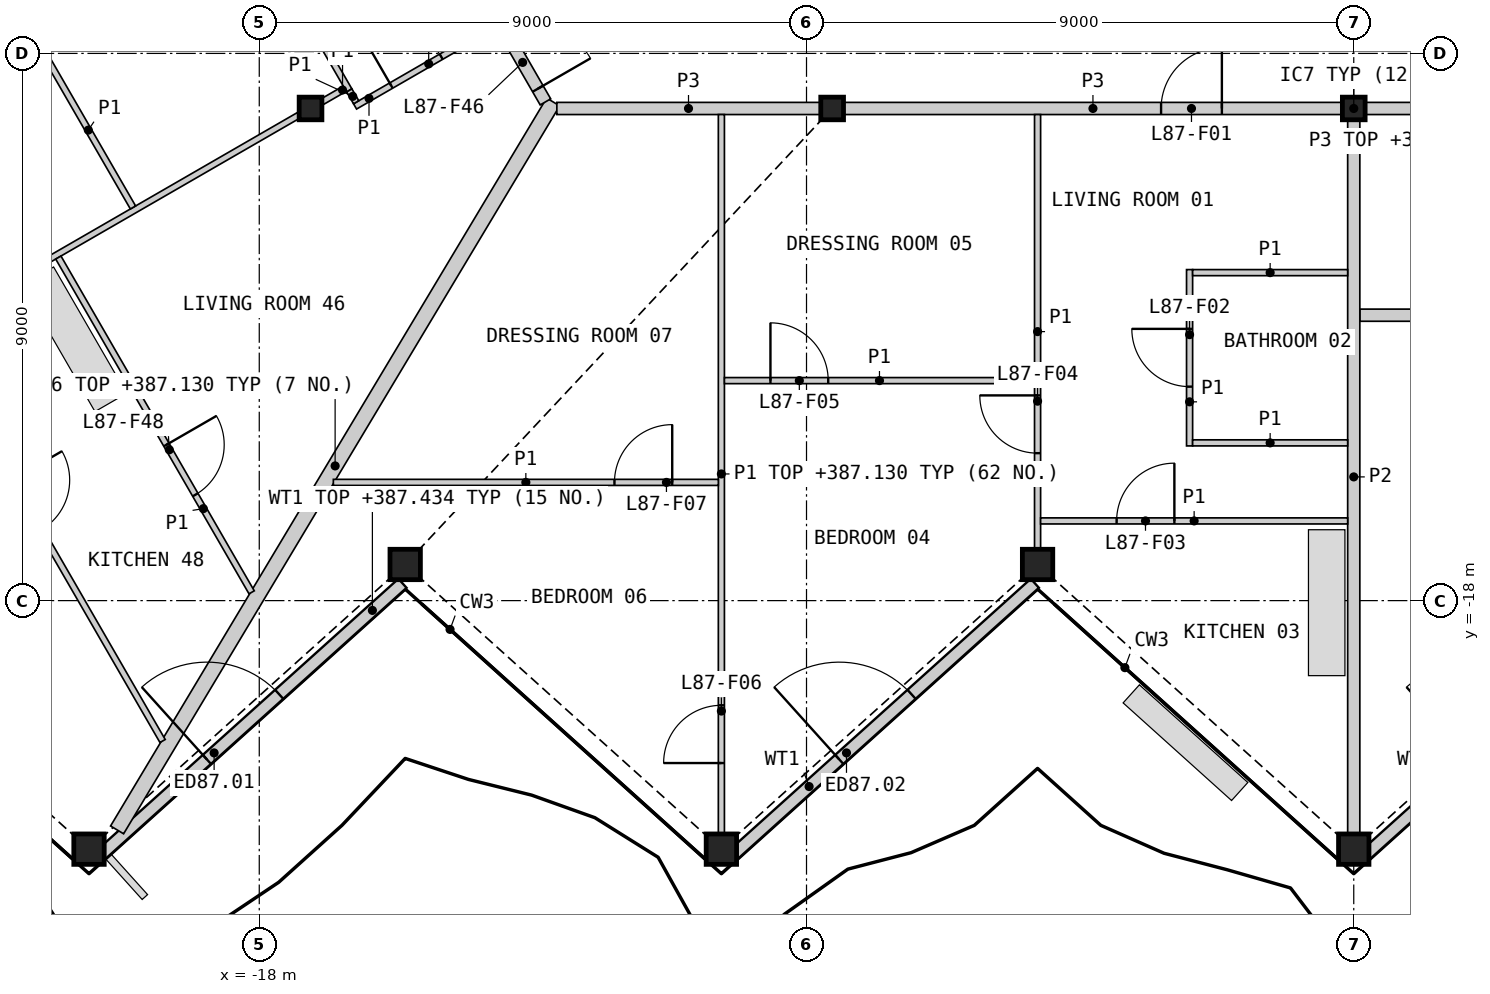
"""IFC4 building model, lengths in metres.
Left out: names, types, materials, properties, quantities, classifications, styles, units other than length and angle.
Written with IfcOpenShell. Run it as: python <this file> out.ifc"""

import sys

from ifc_helpers import new_model, si_unit, direction, frame, frame_2d, origin, origin_2d, place, context, subcontext, project, spatial, rectangle, hollow_rectangle, i_section, extrude, element, fill, save


model = new_model("IFC4")
c1 = context("Model", 3, precision=1e-05, world=origin(), true_north=direction((0.0, 1.0)))
c2 = subcontext(c1, "Body", "Model", "MODEL_VIEW")
j1 = project(units=[si_unit("LENGTHUNIT", "METRE"), si_unit("PLANEANGLEUNIT", "RADIAN")], contexts=[c1])
p1 = place(None, origin())
s1 = spatial("IfcSite", under=j1, at=p1, CompositionType="ELEMENT")
p2 = place(p1, origin())
s2 = spatial("IfcBuilding", under=s1, at=p2, CompositionType="ELEMENT")
p3 = place(p2, frame((0.0, 0.0, 384.8)))
s3 = spatial("IfcBuildingStorey", under=s2, at=p3, CompositionType="ELEMENT", Elevation=384.8)
for number, where, z_axis, x_axis in (
    (1, (-20.8, -22.088, 0.0), (0.0, 0.0, 1.0), (1.0, 0.0, 0.0)),
    (2, (-15.6, -17.406, 0.0), (0.0, 0.0, 1.0), (1.0, 0.0, 0.0)),
    (3, (-10.4, -22.088, 0.0), (0.0, 0.0, 1.0), (1.0, 0.0, 0.0)),
    (4, (-5.2, -17.406, 0.0), (0.0, 0.0, 1.0), (1.0, 0.0, 0.0)),
    (5, (0.0, -22.088, 0.0), (0.0, 0.0, 1.0), (1.0, 0.0, 0.0)),
):
    element("IfcColumn", number, at=place(p3, frame(where, z_axis=z_axis, x_axis=x_axis)), inside=s3, PredefinedType="COLUMN", context=c2, shape_type="SweptSolid", body=[
        extrude(hollow_rectangle(XDim=0.5, YDim=0.5, WallThickness=0.03, at=origin_2d()), origin(), (0.0, 0.0, 1.0), 3.4),
    ])
for number, where, z_axis, x_axis in (
    (6, (-17.157, -9.906, 0.0), (0.0, 0.0, 1.0), (1.0, 0.0, 0.0)),
    (7, (-8.578, -9.906, 0.0), (0.0, 0.0, 1.0), (1.0, 0.0, 0.0)),
    (8, (0.0, -9.906, 0.0), (0.0, 0.0, 1.0), (1.0, 0.0, 0.0)),
):
    element("IfcColumn", number, at=place(p3, frame(where, z_axis=z_axis, x_axis=x_axis)), inside=s3, PredefinedType="COLUMN", context=c2, shape_type="SweptSolid", body=[
        extrude(i_section(OverallWidth=0.374, OverallDepth=0.372, WebThickness=0.016, FlangeThickness=0.026, at=origin_2d()), origin(), (0.0, 0.0, 1.0), 3.4),
    ])
p4 = place(p3, frame((-20.595, -22.173, 0.0), z_axis=(0.0, 0.0, 1.0), x_axis=(0.743135582201, 0.669140871915, 0.0)))
e9 = element("IfcWall", 9, at=p4, inside=s3, PredefinedType="SOLIDWALL", context=c2, shape_type="SweptSolid", body=[
    extrude(rectangle(XDim=6.662, YDim=0.2, at=frame_2d((3.331, 0.0))), origin(), (0.0, 0.0, 1.0), 2.634),
])
p5 = place(p4, frame((2.333, 0.0, 0.0)))
e10 = element("IfcOpeningElement", 10, at=p5, cuts=e9, PredefinedType="OPENING", context=c2, shape_type="SweptSolid", body=[
    extrude(rectangle(XDim=1.6, YDim=2.25, at=frame_2d((0.8, 1.125))), frame((0.0, 0.11, 0.0), z_axis=(0.0, -1.0, 0.0), x_axis=(1.0, 0.0, 0.0)), (0.0, 0.0, 1.0), 0.22),
])
p6 = place(p3, frame((-10.195, -22.173, 0.0), z_axis=(0.0, 0.0, 1.0), x_axis=(0.743119171875, 0.669159096473, 0.0)))
e11 = element("IfcWall", 11, at=p6, inside=s3, PredefinedType="SOLIDWALL", context=c2, shape_type="SweptSolid", body=[
    extrude(rectangle(XDim=6.661, YDim=0.2, at=frame_2d((3.331, 0.0))), origin(), (0.0, 0.0, 1.0), 2.634),
])
p7 = place(p6, frame((2.333, 0.0, 0.0)))
e12 = element("IfcOpeningElement", 12, at=p7, cuts=e11, PredefinedType="OPENING", context=c2, shape_type="SweptSolid", body=[
    extrude(rectangle(XDim=1.6, YDim=2.25, at=frame_2d((0.8, 1.125))), frame((0.0, 0.11, 0.0), z_axis=(0.0, -1.0, 0.0), x_axis=(1.0, 0.0, 0.0)), (0.0, 0.0, 1.0), 0.22),
])
p8 = place(p3, frame((0.205, -22.173, 0.0), z_axis=(0.0, 0.0, 1.0), x_axis=(0.743135582201, 0.669140871915, 0.0)))
e13 = element("IfcWall", 13, at=p8, inside=s3, PredefinedType="SOLIDWALL", context=c2, shape_type="SweptSolid", body=[
    extrude(rectangle(XDim=6.662, YDim=0.2, at=frame_2d((3.331, 0.0))), origin(), (0.0, 0.0, 1.0), 2.634),
])
p9 = place(p8, frame((2.333, 0.0, 0.0)))
e14 = element("IfcOpeningElement", 14, at=p9, cuts=e13, PredefinedType="OPENING", context=c2, shape_type="SweptSolid", body=[
    extrude(rectangle(XDim=1.6, YDim=2.25, at=frame_2d((0.8, 1.125))), frame((0.0, 0.11, 0.0), z_axis=(0.0, -1.0, 0.0), x_axis=(1.0, 0.0, 0.0)), (0.0, 0.0, 1.0), 0.22),
])
p10 = place(p3, frame((-20.338, -21.771, 0.0), z_axis=(0.0, 0.0, 1.0), x_axis=(0.513878217441, 0.857863146218, 0.0)))
e15 = element("IfcWall", 15, at=p10, inside=s3, PredefinedType="PARTITIONING", context=c2, shape_type="SweptSolid", body=[
    extrude(rectangle(XDim=13.956, YDim=0.25, at=frame_2d((6.978, 0.0))), origin(), (0.0, 0.0, 1.0), 2.33),
])
p11 = place(p3, frame((0.197, -9.906, 0.0), z_axis=(0.0, 0.0, 1.0), x_axis=(1.0, 0.0, 0.0)))
e16 = element("IfcWall", 16, at=p11, inside=s3, PredefinedType="PARTITIONING", context=c2, shape_type="SweptSolid", body=[
    extrude(rectangle(XDim=8.185, YDim=0.2, at=frame_2d((4.092, 0.0))), origin(), (0.0, 0.0, 1.0), 3.1),
])
p12 = place(p11, frame((3.567, 0.0, 0.0)))
e17 = element("IfcOpeningElement", 17, at=p12, cuts=e16, PredefinedType="OPENING", context=c2, shape_type="SweptSolid", body=[
    extrude(rectangle(XDim=0.95, YDim=2.1, at=frame_2d((0.475, 1.05))), frame((0.0, 0.11, 0.0), z_axis=(0.0, -1.0, 0.0), x_axis=(1.0, 0.0, 0.0)), (0.0, 0.0, 1.0), 0.22),
])
p13 = place(p3, frame((-8.382, -9.906, 0.0), z_axis=(0.0, 0.0, 1.0), x_axis=(1.0, 0.0, 0.0)))
e18 = element("IfcWall", 18, at=p13, inside=s3, PredefinedType="PARTITIONING", context=c2, shape_type="SweptSolid", body=[
    extrude(rectangle(XDim=8.185, YDim=0.2, at=frame_2d((4.092, 0.0))), origin(), (0.0, 0.0, 1.0), 3.1),
])
p14 = place(p13, frame((5.213, 0.0, 0.0)))
e19 = element("IfcOpeningElement", 19, at=p14, cuts=e18, PredefinedType="OPENING", context=c2, shape_type="SweptSolid", body=[
    extrude(rectangle(XDim=1.0, YDim=2.1, at=frame_2d((0.5, 1.05))), frame((0.0, 0.11, 0.0), z_axis=(0.0, -1.0, 0.0), x_axis=(1.0, 0.0, 0.0)), (0.0, 0.0, 1.0), 0.22),
])
p15 = place(p3, frame((-13.106, -9.906, 0.0), z_axis=(0.0, 0.0, 1.0), x_axis=(1.0, 0.0, 0.0)))
e20 = element("IfcWall", 20, at=p15, inside=s3, PredefinedType="PARTITIONING", context=c2, shape_type="SweptSolid", body=[
    extrude(rectangle(XDim=4.331, YDim=0.2, at=frame_2d((2.165, 0.0))), origin(), (0.0, 0.0, 1.0), 3.1),
])
p16 = place(p3, frame((-15.131, -6.614, 0.0), z_axis=(0.0, 0.0, 1.0), x_axis=(0.499967746641, -0.866044024469, 0.0)))
e21 = element("IfcWall", 21, at=p16, inside=s3, PredefinedType="PARTITIONING", context=c2, shape_type="SweptSolid", body=[
    extrude(rectangle(XDim=3.676, YDim=0.2, at=frame_2d((1.838, 0.0))), origin(), (0.0, 0.0, 1.0), 3.1),
])
p17 = place(p16, frame((2.426, 0.0, 0.0)))
e22 = element("IfcOpeningElement", 22, at=p17, cuts=e21, PredefinedType="OPENING", context=c2, shape_type="SweptSolid", body=[
    extrude(rectangle(XDim=1.0, YDim=2.1, at=frame_2d((0.5, 1.05))), frame((0.0, 0.11, 0.0), z_axis=(0.0, -1.0, 0.0), x_axis=(1.0, 0.0, 0.0)), (0.0, 0.0, 1.0), 0.22),
])
p18 = place(p3, frame((0.1, -13.306, 0.0), z_axis=(0.0, 0.0, 1.0), x_axis=(1.0, 0.0, 0.0)))
e23 = element("IfcWall", 23, at=p18, inside=s3, PredefinedType="PARTITIONING", context=c2, shape_type="SweptSolid", body=[
    extrude(rectangle(XDim=15.094, YDim=0.2, at=frame_2d((7.547, 0.0))), origin(), (0.0, 0.0, 1.0), 2.33),
])
p19 = place(p18, frame((9.781, 0.0, 0.0)))
e24 = element("IfcOpeningElement", 24, at=p19, cuts=e23, PredefinedType="OPENING", context=c2, shape_type="SweptSolid", body=[
    extrude(rectangle(XDim=0.95, YDim=2.1, at=frame_2d((0.475, 1.05))), frame((0.0, 0.11, 0.0), z_axis=(0.0, -1.0, 0.0), x_axis=(1.0, 0.0, 0.0)), (0.0, 0.0, 1.0), 0.22),
])
p20 = place(p3, frame((0.0, -21.828, 0.0), z_axis=(0.0, 0.0, 1.0), x_axis=(0.0, 1.0, 0.0)))
e25 = element("IfcWall", 25, at=p20, inside=s3, PredefinedType="PARTITIONING", context=c2, shape_type="SweptSolid", body=[
    extrude(rectangle(XDim=11.725, YDim=0.2, at=frame_2d((5.863, 0.0))), origin(), (0.0, 0.0, 1.0), 2.33),
])
p21 = place(p3, frame((-10.4, -21.828, 0.0), z_axis=(0.0, 0.0, 1.0), x_axis=(0.0, 1.0, 0.0)))
e26 = element("IfcWall", 26, at=p21, inside=s3, PredefinedType="PARTITIONING", context=c2, shape_type="SweptSolid", body=[
    extrude(rectangle(XDim=11.822, YDim=0.1, at=frame_2d((5.911, 0.0))), origin(), (0.0, 0.0, 1.0), 2.33),
])
p22 = place(p21, frame((1.156, 0.0, 0.0)))
e27 = element("IfcOpeningElement", 27, at=p22, cuts=e26, PredefinedType="OPENING", context=c2, shape_type="SweptSolid", body=[
    extrude(rectangle(XDim=0.95, YDim=2.1, at=frame_2d((0.475, 1.05))), frame((0.0, 0.06, 0.0), z_axis=(0.0, -1.0, 0.0), x_axis=(1.0, 0.0, 0.0)), (0.0, 0.0, 1.0), 0.12),
])
p23 = place(p3, frame((-26.777, -15.46, 0.0), z_axis=(0.0, 0.0, 1.0), x_axis=(0.866019680922, 0.500009912158, 0.0)))
e28 = element("IfcWall", 28, at=p23, inside=s3, PredefinedType="PARTITIONING", context=c2, shape_type="SweptSolid", body=[
    extrude(rectangle(XDim=10.881, YDim=0.1, at=frame_2d((5.44, 0.0))), origin(), (0.0, 0.0, 1.0), 2.33),
])
p24 = place(p23, frame((1.454, 0.0, 0.0)))
e29 = element("IfcOpeningElement", 29, at=p24, cuts=e28, PredefinedType="OPENING", context=c2, shape_type="SweptSolid", body=[
    extrude(rectangle(XDim=0.95, YDim=2.1, at=frame_2d((0.475, 1.05))), frame((0.0, 0.06, 0.0), z_axis=(0.0, -1.0, 0.0), x_axis=(1.0, 0.0, 0.0)), (0.0, 0.0, 1.0), 0.12),
])
p25 = place(p3, frame((-23.462, -13.603, 0.0), z_axis=(0.0, 0.0, 1.0), x_axis=(0.499998111909, -0.866026493871, 0.0)))
e30 = element("IfcWall", 30, at=p25, inside=s3, PredefinedType="PARTITIONING", context=c2, shape_type="SweptSolid", body=[
    extrude(rectangle(XDim=7.743, YDim=0.1, at=frame_2d((3.872, 0.0))), origin(), (0.0, 0.0, 1.0), 2.33),
])
p26 = place(p25, frame((2.788, 0.0, 0.0)))
e31 = element("IfcOpeningElement", 31, at=p26, cuts=e30, PredefinedType="OPENING", context=c2, shape_type="SweptSolid", body=[
    extrude(rectangle(XDim=0.95, YDim=2.1, at=frame_2d((0.475, 1.05))), frame((0.0, 0.06, 0.0), z_axis=(0.0, -1.0, 0.0), x_axis=(1.0, 0.0, 0.0)), (0.0, 0.0, 1.0), 0.12),
])
p27 = place(p3, frame((-5.2, -17.146, 0.0), z_axis=(0.0, 0.0, 1.0), x_axis=(0.0, 1.0, 0.0)))
e32 = element("IfcWall", 32, at=p27, inside=s3, PredefinedType="PARTITIONING", context=c2, shape_type="SweptSolid", body=[
    extrude(rectangle(XDim=7.14, YDim=0.1, at=frame_2d((3.57, 0.0))), origin(), (0.0, 0.0, 1.0), 2.33),
])
p28 = place(p27, frame((1.571, 0.0, 0.0)))
e33 = element("IfcOpeningElement", 33, at=p28, cuts=e32, PredefinedType="OPENING", context=c2, shape_type="SweptSolid", body=[
    extrude(rectangle(XDim=0.95, YDim=2.1, at=frame_2d((0.475, 1.05))), frame((0.0, 0.06, 0.0), z_axis=(0.0, -1.0, 0.0), x_axis=(1.0, 0.0, 0.0)), (0.0, 0.0, 1.0), 0.12),
])
p29 = place(p3, frame((-21.304, -12.358, 0.0), z_axis=(0.0, 0.0, 1.0), x_axis=(0.500000558108, -0.866025081561, 0.0)))
e34 = element("IfcWall", 34, at=p29, inside=s3, PredefinedType="PARTITIONING", context=c2, shape_type="SweptSolid", body=[
    extrude(rectangle(XDim=6.358, YDim=0.1, at=frame_2d((3.179, 0.0))), origin(), (0.0, 0.0, 1.0), 2.33),
])
p30 = place(p29, frame((3.555, 0.0, 0.0)))
e35 = element("IfcOpeningElement", 35, at=p30, cuts=e34, PredefinedType="OPENING", context=c2, shape_type="SweptSolid", body=[
    extrude(rectangle(XDim=0.95, YDim=2.1, at=frame_2d((0.475, 1.05))), frame((0.0, 0.06, 0.0), z_axis=(0.0, -1.0, 0.0), x_axis=(1.0, 0.0, 0.0)), (0.0, 0.0, 1.0), 0.12),
])
p31 = place(p3, frame((-16.781, -16.055, 0.0), z_axis=(0.0, 0.0, 1.0), x_axis=(1.0, 0.0, 0.0)))
e36 = element("IfcWall", 36, at=p31, inside=s3, PredefinedType="PARTITIONING", context=c2, shape_type="SweptSolid", body=[
    extrude(rectangle(XDim=6.332, YDim=0.1, at=frame_2d((3.166, 0.0))), origin(), (0.0, 0.0, 1.0), 2.33),
])
p32 = place(p31, frame((4.623, 0.0, 0.0)))
e37 = element("IfcOpeningElement", 37, at=p32, cuts=e36, PredefinedType="OPENING", context=c2, shape_type="SweptSolid", body=[
    extrude(rectangle(XDim=0.95, YDim=2.1, at=frame_2d((0.475, 1.05))), frame((0.0, 0.06, 0.0), z_axis=(0.0, -1.0, 0.0), x_axis=(1.0, 0.0, 0.0)), (0.0, 0.0, 1.0), 0.12),
])
p33 = place(p3, frame((-5.15, -16.689, 0.0), z_axis=(0.0, 0.0, 1.0), x_axis=(1.0, 0.0, 0.0)))
e38 = element("IfcWall", 38, at=p33, inside=s3, PredefinedType="PARTITIONING", context=c2, shape_type="SweptSolid", body=[
    extrude(rectangle(XDim=5.05, YDim=0.1, at=frame_2d((2.525, 0.0))), origin(), (0.0, 0.0, 1.0), 2.33),
])
p34 = place(p33, frame((1.25, 0.0, 0.0)))
e39 = element("IfcOpeningElement", 39, at=p34, cuts=e38, PredefinedType="OPENING", context=c2, shape_type="SweptSolid", body=[
    extrude(rectangle(XDim=0.95, YDim=2.1, at=frame_2d((0.475, 1.05))), frame((0.0, 0.06, 0.0), z_axis=(0.0, -1.0, 0.0), x_axis=(1.0, 0.0, 0.0)), (0.0, 0.0, 1.0), 0.12),
])
p35 = place(p3, frame((-10.35, -14.382, 0.0), z_axis=(0.0, 0.0, 1.0), x_axis=(1.0, 0.0, 0.0)))
e40 = element("IfcWall", 40, at=p35, inside=s3, PredefinedType="PARTITIONING", context=c2, shape_type="SweptSolid", body=[
    extrude(rectangle(XDim=5.1, YDim=0.1, at=frame_2d((2.55, 0.0))), origin(), (0.0, 0.0, 1.0), 2.33),
])
p36 = place(p35, frame((0.757, 0.0, 0.0)))
e41 = element("IfcOpeningElement", 41, at=p36, cuts=e40, PredefinedType="OPENING", context=c2, shape_type="SweptSolid", body=[
    extrude(rectangle(XDim=0.95, YDim=2.1, at=frame_2d((0.475, 1.05))), frame((0.0, 0.06, 0.0), z_axis=(0.0, -1.0, 0.0), x_axis=(1.0, 0.0, 0.0)), (0.0, 0.0, 1.0), 0.12),
])
p37 = place(p3, frame((-21.546, -8.989, 0.0), z_axis=(0.0, 0.0, 1.0), x_axis=(0.499919039967, -0.866072141036, 0.0)))
e42 = element("IfcWall", 42, at=p37, inside=s3, PredefinedType="PARTITIONING", context=c2, shape_type="SweptSolid", body=[
    extrude(rectangle(XDim=2.938, YDim=0.1, at=frame_2d((1.469, 0.0))), origin(), (0.0, 0.0, 1.0), 2.33),
])
p38 = place(p3, frame((-2.7, -15.456, 0.0), z_axis=(0.0, 0.0, 1.0), x_axis=(0.0, 1.0, 0.0)))
e43 = element("IfcWall", 43, at=p38, inside=s3, PredefinedType="PARTITIONING", context=c2, shape_type="SweptSolid", body=[
    extrude(rectangle(XDim=2.9, YDim=0.1, at=frame_2d((1.45, 0.0))), origin(), (0.0, 0.0, 1.0), 2.33),
])
p39 = place(p38, frame((0.975, 0.0, 0.0)))
e44 = element("IfcOpeningElement", 44, at=p39, cuts=e43, PredefinedType="OPENING", context=c2, shape_type="SweptSolid", body=[
    extrude(rectangle(XDim=0.95, YDim=2.1, at=frame_2d((0.475, 1.05))), frame((0.0, 0.06, 0.0), z_axis=(0.0, -1.0, 0.0), x_axis=(1.0, 0.0, 0.0)), (0.0, 0.0, 1.0), 0.12),
])
for number, where, z_axis, x_axis in (
    (45, (-2.65, -12.606, 0.0), (0.0, 0.0, 1.0), (1.0, 0.0, 0.0)),
    (46, (-2.65, -15.406, 0.0), (0.0, 0.0, 1.0), (1.0, 0.0, 0.0)),
):
    element("IfcWall", number, at=place(p3, frame(where, z_axis=z_axis, x_axis=x_axis)), inside=s3, PredefinedType="PARTITIONING", context=c2, shape_type="SweptSolid", body=[
        extrude(rectangle(XDim=2.55, YDim=0.1, at=frame_2d((1.275, 0.0))), origin(), (0.0, 0.0, 1.0), 2.33),
    ])
p40 = place(p3, frame((-16.425, -9.872, 0.0), z_axis=(0.0, 0.0, 1.0), x_axis=(0.86603978909, 0.499975083092, 0.0)))
e47 = element("IfcWall", 47, at=p40, inside=s3, PredefinedType="PARTITIONING", context=c2, shape_type="SweptSolid", body=[
    extrude(rectangle(XDim=2.649, YDim=0.1, at=frame_2d((1.325, 0.0))), origin(), (0.0, 0.0, 1.0), 2.33),
])
p41 = place(p40, frame((0.686, 0.0, 0.0)))
e48 = element("IfcOpeningElement", 48, at=p41, cuts=e47, PredefinedType="OPENING", context=c2, shape_type="SweptSolid", body=[
    extrude(rectangle(XDim=0.95, YDim=2.1, at=frame_2d((0.475, 1.05))), frame((0.0, 0.06, 0.0), z_axis=(0.0, -1.0, 0.0), x_axis=(1.0, 0.0, 0.0)), (0.0, 0.0, 1.0), 0.12),
])
p42 = place(p3, frame((-17.507, -7.899, 0.0), z_axis=(0.0, 0.0, 1.0), x_axis=(0.500011643316, -0.866018681408, 0.0)))
e49 = element("IfcWall", 49, at=p42, inside=s3, PredefinedType="PARTITIONING", context=c2, shape_type="SweptSolid", body=[
    extrude(rectangle(XDim=1.973, YDim=0.1, at=frame_2d((0.987, 0.0))), origin(), (0.0, 0.0, 1.0), 2.33),
])
p43 = place(p3, frame((-16.96, -9.792, 0.0), z_axis=(0.0, 0.0, 1.0), x_axis=(0.866137484628, 0.499805820016, 0.0)))
e50 = element("IfcWall", 50, at=p43, inside=s3, PredefinedType="PARTITIONING", context=c2, shape_type="SweptSolid", body=[
    extrude(rectangle(XDim=0.423, YDim=0.1, at=frame_2d((0.211, 0.0))), origin(), (0.0, 0.0, 1.0), 2.33),
])
p44 = place(p3, frame((-16.519, -9.61, 0.0), z_axis=(0.0, 0.0, 1.0), x_axis=(0.50245032488, -0.864606078528, 0.0)))
e51 = element("IfcWall", 51, at=p44, inside=s3, PredefinedType="PARTITIONING", context=c2, shape_type="SweptSolid", body=[
    extrude(rectangle(XDim=0.224, YDim=0.1, at=frame_2d((0.112, 0.0))), origin(), (0.0, 0.0, 1.0), 2.33),
])
p45 = place(p5, origin())
e52 = element("IfcDoor", 52, at=p45, inside=s3, OperationType="DOUBLE_DOOR_SINGLE_SWING", PredefinedType="DOOR", context=c2, shape_type="SweptSolid", body=[
    extrude(rectangle(XDim=1.6, YDim=2.25, at=frame_2d((0.8, 1.125))), frame((0.0, 0.025, 0.0), z_axis=(0.0, -1.0, 0.0), x_axis=(1.0, 0.0, 0.0)), (0.0, 0.0, 1.0), 0.05),
])
fill(e10, e52)
p46 = place(p7, origin())
e53 = element("IfcDoor", 53, at=p46, inside=s3, OperationType="DOUBLE_DOOR_SINGLE_SWING", PredefinedType="DOOR", context=c2, shape_type="SweptSolid", body=[
    extrude(rectangle(XDim=1.6, YDim=2.25, at=frame_2d((0.8, 1.125))), frame((0.0, 0.025, 0.0), z_axis=(0.0, -1.0, 0.0), x_axis=(1.0, 0.0, 0.0)), (0.0, 0.0, 1.0), 0.05),
])
fill(e12, e53)
p47 = place(p14, origin())
e54 = element("IfcDoor", 54, at=p47, inside=s3, OperationType="SINGLE_SWING_RIGHT", PredefinedType="DOOR", context=c2, shape_type="SweptSolid", body=[
    extrude(rectangle(XDim=1.0, YDim=2.1, at=frame_2d((0.5, 1.05))), frame((0.0, 0.025, 0.0), z_axis=(0.0, -1.0, 0.0), x_axis=(1.0, 0.0, 0.0)), (0.0, 0.0, 1.0), 0.05),
])
fill(e19, e54)
p48 = place(p39, origin())
e55 = element("IfcDoor", 55, at=p48, inside=s3, OperationType="SINGLE_SWING_RIGHT", PredefinedType="DOOR", context=c2, shape_type="SweptSolid", body=[
    extrude(rectangle(XDim=0.95, YDim=2.1, at=frame_2d((0.475, 1.05))), frame((0.0, 0.025, 0.0), z_axis=(0.0, -1.0, 0.0), x_axis=(1.0, 0.0, 0.0)), (0.0, 0.0, 1.0), 0.05),
])
fill(e44, e55)
p49 = place(p34, origin())
e56 = element("IfcDoor", 56, at=p49, inside=s3, OperationType="SINGLE_SWING_RIGHT", PredefinedType="DOOR", context=c2, shape_type="SweptSolid", body=[
    extrude(rectangle(XDim=0.95, YDim=2.1, at=frame_2d((0.475, 1.05))), frame((0.0, 0.025, 0.0), z_axis=(0.0, -1.0, 0.0), x_axis=(1.0, 0.0, 0.0)), (0.0, 0.0, 1.0), 0.05),
])
fill(e39, e56)
p50 = place(p28, origin())
e57 = element("IfcDoor", 57, at=p50, inside=s3, OperationType="SINGLE_SWING_RIGHT", PredefinedType="DOOR", context=c2, shape_type="SweptSolid", body=[
    extrude(rectangle(XDim=0.95, YDim=2.1, at=frame_2d((0.475, 1.05))), frame((0.0, 0.025, 0.0), z_axis=(0.0, -1.0, 0.0), x_axis=(1.0, 0.0, 0.0)), (0.0, 0.0, 1.0), 0.05),
])
fill(e33, e57)
p51 = place(p36, origin())
e58 = element("IfcDoor", 58, at=p51, inside=s3, OperationType="SINGLE_SWING_LEFT", PredefinedType="DOOR", context=c2, shape_type="SweptSolid", body=[
    extrude(rectangle(XDim=0.95, YDim=2.1, at=frame_2d((0.475, 1.05))), frame((0.0, 0.025, 0.0), z_axis=(0.0, -1.0, 0.0), x_axis=(1.0, 0.0, 0.0)), (0.0, 0.0, 1.0), 0.05),
])
fill(e41, e58)
p52 = place(p22, origin())
e59 = element("IfcDoor", 59, at=p52, inside=s3, OperationType="SINGLE_SWING_LEFT", PredefinedType="DOOR", context=c2, shape_type="SweptSolid", body=[
    extrude(rectangle(XDim=0.95, YDim=2.1, at=frame_2d((0.475, 1.05))), frame((0.0, 0.025, 0.0), z_axis=(0.0, -1.0, 0.0), x_axis=(1.0, 0.0, 0.0)), (0.0, 0.0, 1.0), 0.05),
])
fill(e27, e59)
p53 = place(p32, origin())
e60 = element("IfcDoor", 60, at=p53, inside=s3, OperationType="SINGLE_SWING_RIGHT", PredefinedType="DOOR", context=c2, shape_type="SweptSolid", body=[
    extrude(rectangle(XDim=0.95, YDim=2.1, at=frame_2d((0.475, 1.05))), frame((0.0, 0.025, 0.0), z_axis=(0.0, -1.0, 0.0), x_axis=(1.0, 0.0, 0.0)), (0.0, 0.0, 1.0), 0.05),
])
fill(e37, e60)
p54 = place(p17, origin())
e61 = element("IfcDoor", 61, at=p54, inside=s3, OperationType="SINGLE_SWING_RIGHT", PredefinedType="DOOR", context=c2, shape_type="SweptSolid", body=[
    extrude(rectangle(XDim=1.0, YDim=2.1, at=frame_2d((0.5, 1.05))), frame((0.0, 0.025, 0.0), z_axis=(0.0, -1.0, 0.0), x_axis=(1.0, 0.0, 0.0)), (0.0, 0.0, 1.0), 0.05),
])
fill(e22, e61)
p55 = place(p41, origin())
e62 = element("IfcDoor", 62, at=p55, inside=s3, OperationType="SINGLE_SWING_LEFT", PredefinedType="DOOR", context=c2, shape_type="SweptSolid", body=[
    extrude(rectangle(XDim=0.95, YDim=2.1, at=frame_2d((0.475, 1.05))), frame((0.0, 0.025, 0.0), z_axis=(0.0, -1.0, 0.0), x_axis=(1.0, 0.0, 0.0)), (0.0, 0.0, 1.0), 0.05),
])
fill(e48, e62)
p56 = place(p30, origin())
e63 = element("IfcDoor", 63, at=p56, inside=s3, OperationType="SINGLE_SWING_LEFT", PredefinedType="DOOR", context=c2, shape_type="SweptSolid", body=[
    extrude(rectangle(XDim=0.95, YDim=2.1, at=frame_2d((0.475, 1.05))), frame((0.0, 0.025, 0.0), z_axis=(0.0, -1.0, 0.0), x_axis=(1.0, 0.0, 0.0)), (0.0, 0.0, 1.0), 0.05),
])
fill(e35, e63)
save(model, sys.argv[1])
